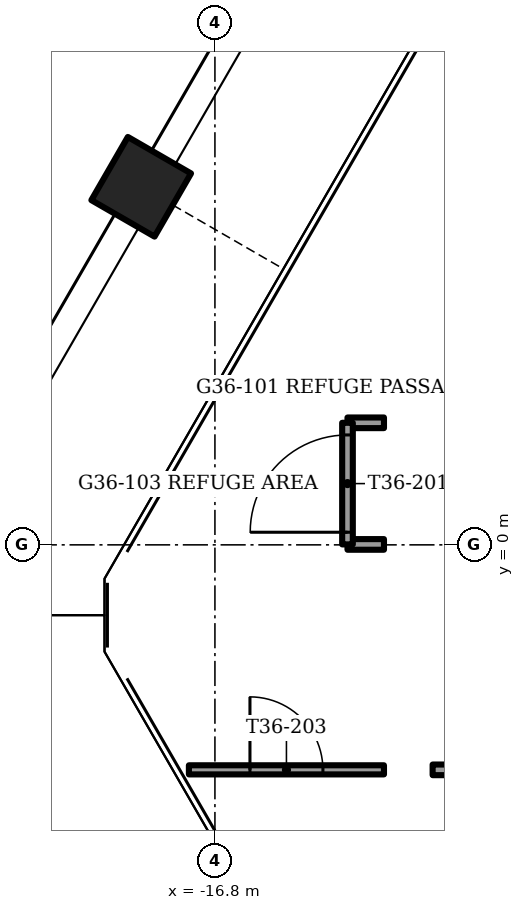
"""IFC4 building model, lengths in metres.
Left out: names, types, materials, properties, quantities, classifications, styles, units other than length and angle.
Written with IfcOpenShell. Run it as: python <this file> out.ifc"""

import sys

from ifc_helpers import new_model, si_unit, direction, frame, frame_2d, origin, origin_2d, place, context, subcontext, project, spatial, rectangle, extrude, element, fill, save


model = new_model("IFC4")
c1 = context("Model", 3, precision=1e-05, world=origin(), true_north=direction((0.0, 1.0)))
c2 = subcontext(c1, "Body", "Model", "MODEL_VIEW")
j1 = project(units=[si_unit("LENGTHUNIT", "METRE"), si_unit("PLANEANGLEUNIT", "RADIAN")], contexts=[c1])
p1 = place(None, origin())
s1 = spatial("IfcSite", under=j1, at=p1, CompositionType="ELEMENT")
p2 = place(p1, origin())
s2 = spatial("IfcBuilding", under=s1, at=p2, CompositionType="ELEMENT")
p3 = place(p2, frame((0.0, 0.0, 146.0)))
s3 = spatial("IfcBuildingStorey", under=s2, at=p3, CompositionType="ELEMENT", Elevation=146.0)
p4 = place(p3, frame((-18.012, 5.888, -1.2), z_axis=(0.0, 0.0, 1.0), x_axis=(0.5, 0.866025403784, 0.0)))
e1 = element("IfcColumn", 1, at=p4, inside=s3, PredefinedType="COLUMN", context=c2, shape_type="SweptSolid", body=[
    extrude(rectangle(XDim=1.2, YDim=1.2, at=origin_2d()), origin(), (0.0, 0.0, 1.0), 5.0),
])
p5 = place(p3, frame((-13.22, -3.7, 0.0), z_axis=(0.0, 0.0, 1.0), x_axis=(1.0, 0.0, 0.0)))
e2 = element("IfcWall", 2, at=p5, inside=s3, PredefinedType="PARTITIONING", context=c2, shape_type="SweptSolid", body=[
    extrude(rectangle(XDim=3.84, YDim=0.175, at=frame_2d((1.92, 0.0))), origin(), (0.0, 0.0, 1.0), 4.7),
])
p6 = place(p5, frame((1.32, 0.0, 0.0)))
e3 = element("IfcOpeningElement", 3, at=p6, cuts=e2, PredefinedType="OPENING", context=c2, shape_type="SweptSolid", body=[
    extrude(rectangle(XDim=1.2, YDim=2.1, at=frame_2d((0.6, 1.05))), frame((0.0, 0.087, 0.0), z_axis=(0.0, -1.0, 0.0), x_axis=(1.0, 0.0, 0.0)), (0.0, 0.0, 1.0), 0.175),
])
for number, where, z_axis, x_axis in (
    (4, (-14.62, 0.007, 0.0), (0.0, 0.0, 1.0), (1.0, 0.0, 0.0)),
    (5, (-14.62, 2.007, 0.0), (0.0, 0.0, 1.0), (1.0, 0.0, 0.0)),
):
    element("IfcWall", number, at=place(p3, frame(where, z_axis=z_axis, x_axis=x_axis)), inside=s3, PredefinedType="PARTITIONING", context=c2, shape_type="SweptSolid", body=[
        extrude(rectangle(XDim=0.6, YDim=0.175, at=frame_2d((0.3, 0.0))), origin(), (0.0, 0.0, 1.0), 4.7),
    ])
p7 = place(p3, frame((-14.62, 0.007, 0.0), z_axis=(0.0, 0.0, 1.0), x_axis=(0.0, 1.0, 0.0)))
e6 = element("IfcWall", 6, at=p7, inside=s3, PredefinedType="PARTITIONING", context=c2, shape_type="SweptSolid", body=[
    extrude(rectangle(XDim=2.0, YDim=0.175, at=frame_2d((1.0, 0.0))), origin(), (0.0, 0.0, 1.0), 4.7),
])
p8 = place(p7, frame((0.2, 0.0, 0.0)))
e7 = element("IfcOpeningElement", 7, at=p8, cuts=e6, PredefinedType="OPENING", context=c2, shape_type="SweptSolid", body=[
    extrude(rectangle(XDim=1.6, YDim=2.1, at=frame_2d((0.8, 1.05))), frame((0.0, 0.087, 0.0), z_axis=(0.0, -1.0, 0.0), x_axis=(1.0, 0.0, 0.0)), (0.0, 0.0, 1.0), 0.175),
])
p9 = place(p3, frame((-17.228, -3.7, 0.0), z_axis=(0.0, 0.0, 1.0), x_axis=(1.0, 0.0, 0.0)))
e8 = element("IfcWall", 8, at=p9, inside=s3, PredefinedType="PARTITIONING", context=c2, shape_type="SweptSolid", body=[
    extrude(rectangle(XDim=3.208, YDim=0.15, at=frame_2d((1.604, 0.0))), origin(), (0.0, 0.0, 1.0), 4.7),
])
p10 = place(p9, frame((1.004, 0.0, 0.0)))
e9 = element("IfcOpeningElement", 9, at=p10, cuts=e8, PredefinedType="OPENING", context=c2, shape_type="SweptSolid", body=[
    extrude(rectangle(XDim=1.2, YDim=2.1, at=frame_2d((0.6, 1.05))), frame((0.0, 0.075, 0.0), z_axis=(0.0, -1.0, 0.0), x_axis=(1.0, 0.0, 0.0)), (0.0, 0.0, 1.0), 0.15),
])
p11 = place(p8, origin())
e10 = element("IfcDoor", 10, at=p11, inside=s3, OperationType="DOUBLE_DOOR_SINGLE_SWING", PredefinedType="DOOR", context=c2, shape_type="SweptSolid", body=[
    extrude(rectangle(XDim=1.6, YDim=2.1, at=frame_2d((0.8, 1.05))), frame((0.0, 0.025, 0.0), z_axis=(0.0, -1.0, 0.0), x_axis=(1.0, 0.0, 0.0)), (0.0, 0.0, 1.0), 0.05),
])
fill(e7, e10)
p12 = place(p10, origin())
e11 = element("IfcDoor", 11, at=p12, inside=s3, OperationType="SINGLE_SWING_LEFT", PredefinedType="DOOR", context=c2, shape_type="SweptSolid", body=[
    extrude(rectangle(XDim=1.2, YDim=2.1, at=frame_2d((0.6, 1.05))), frame((0.0, 0.025, 0.0), z_axis=(0.0, -1.0, 0.0), x_axis=(1.0, 0.0, 0.0)), (0.0, 0.0, 1.0), 0.05),
])
fill(e9, e11)
save(model, sys.argv[1])
